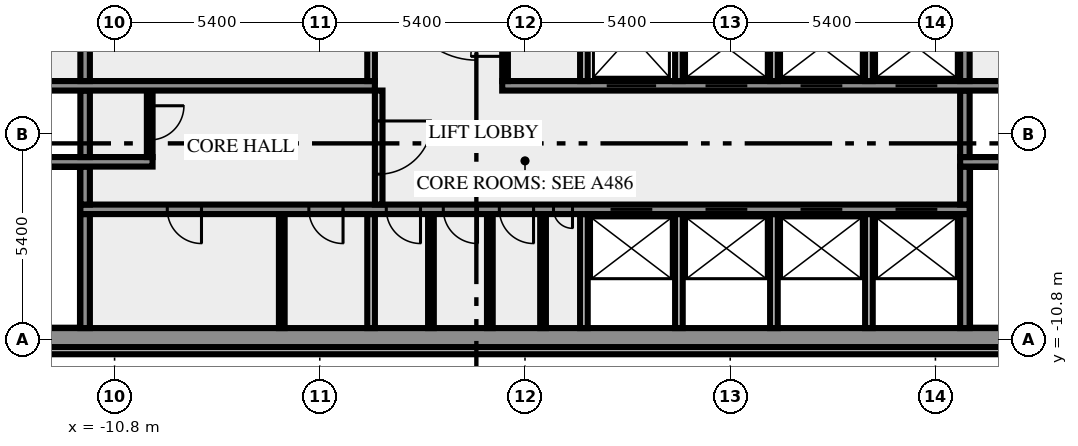
"""IFC4 building model, lengths in metres.
Left out: names, types, materials, properties, quantities, classifications, styles, units other than length and angle.
Written with IfcOpenShell. Run it as: python <this file> out.ifc"""

import sys

from ifc_helpers import new_model, si_unit, direction, frame, frame_2d, origin, place, context, subcontext, project, spatial, rectangle, extrude, element, fill, save


model = new_model("IFC4")
c1 = context("Model", 3, precision=1e-05, world=origin(), true_north=direction((0.0, 1.0)))
c2 = subcontext(c1, "Body", "Model", "MODEL_VIEW")
j1 = project(units=[si_unit("LENGTHUNIT", "METRE"), si_unit("PLANEANGLEUNIT", "RADIAN")], contexts=[c1])
p1 = place(None, origin())
s1 = spatial("IfcSite", under=j1, at=p1, CompositionType="ELEMENT")
p2 = place(p1, origin())
s2 = spatial("IfcBuilding", under=s1, at=p2, CompositionType="ELEMENT")
p3 = place(p2, frame((0.0, 0.0, 176.0)))
s3 = spatial("IfcBuildingStorey", under=s2, at=p3, CompositionType="ELEMENT", Elevation=176.0)
p4 = place(p3, frame((-17.444, -11.088, 0.0), z_axis=(0.0, 0.0, 1.0), x_axis=(1.0, 0.0, 0.0)))
e1 = element("IfcWall", 1, at=p4, inside=s3, PredefinedType="SOLIDWALL", context=c2, shape_type="SweptSolid", body=[
    extrude(rectangle(XDim=34.888, YDim=0.2, at=frame_2d((17.444, 0.0))), origin(), (0.0, 0.0, 1.0), 3.65),
])
p5 = place(p3, frame((-20.0, -10.75, 0.0), z_axis=(0.0, 0.0, 1.0), x_axis=(1.0, 0.0, 0.0)))
e2 = element("IfcWall", 2, at=p5, inside=s3, PredefinedType="SHEAR", context=c2, shape_type="SweptSolid", body=[
    extrude(rectangle(XDim=40.0, YDim=0.5, at=frame_2d((20.0, 0.0))), origin(), (0.0, 0.0, 1.0), 3.65),
])
p6 = place(p5, frame((0.8, 0.0, 1.0)))
e3 = element("IfcOpeningElement", 3, at=p6, cuts=e2, PredefinedType="OPENING", context=c2, shape_type="SweptSolid", body=[
    extrude(rectangle(XDim=1.2, YDim=1.2, at=frame_2d((0.6, 0.6))), frame((0.0, 0.26, 0.0), z_axis=(0.0, -1.0, 0.0), x_axis=(1.0, 0.0, 0.0)), (0.0, 0.0, 1.0), 0.52),
])
p7 = place(p5, frame((38.0, 0.0, 1.0)))
e4 = element("IfcOpeningElement", 4, at=p7, cuts=e2, PredefinedType="OPENING", context=c2, shape_type="SweptSolid", body=[
    extrude(rectangle(XDim=1.2, YDim=1.2, at=frame_2d((0.6, 0.6))), frame((0.0, 0.26, 0.0), z_axis=(0.0, -1.0, 0.0), x_axis=(1.0, 0.0, 0.0)), (0.0, 0.0, 1.0), 0.52),
])
p8 = place(p3, frame((-11.575, -10.5, 0.0), z_axis=(0.0, 0.0, 1.0), x_axis=(0.0, 1.0, 0.0)))
e5 = element("IfcWall", 5, at=p8, inside=s3, PredefinedType="SHEAR", context=c2, shape_type="SweptSolid", body=[
    extrude(rectangle(XDim=3.0, YDim=0.25, at=frame_2d((1.5, 0.0))), origin(), (0.0, 0.0, 1.0), 3.65),
])
p9 = place(p3, frame((-6.4, -10.5, 0.0), z_axis=(0.0, 0.0, 1.0), x_axis=(0.0, 1.0, 0.0)))
e6 = element("IfcWall", 6, at=p9, inside=s3, PredefinedType="PARTITIONING", context=c2, shape_type="SweptSolid", body=[
    extrude(rectangle(XDim=3.0, YDim=0.15, at=frame_2d((1.5, 0.0))), origin(), (0.0, 0.0, 1.0), 3.65),
])
p10 = place(p3, frame((-4.05, -10.5, 0.0), z_axis=(0.0, 0.0, 1.0), x_axis=(0.0, 1.0, 0.0)))
e7 = element("IfcWall", 7, at=p10, inside=s3, PredefinedType="SOLIDWALL", context=c2, shape_type="SweptSolid", body=[
    extrude(rectangle(XDim=3.0, YDim=0.2, at=frame_2d((1.5, 0.0))), origin(), (0.0, 0.0, 1.0), 3.65),
])
for number, where, z_axis, x_axis in (
    (8, (-2.475, -10.5, 0.0), (0.0, 0.0, 1.0), (0.0, 1.0, 0.0)),
    (9, (-0.925, -10.5, 0.0), (0.0, 0.0, 1.0), (0.0, 1.0, 0.0)),
    (10, (0.475, -10.5, 0.0), (0.0, 0.0, 1.0), (0.0, 1.0, 0.0)),
):
    element("IfcWall", number, at=place(p3, frame(where, z_axis=z_axis, x_axis=x_axis)), inside=s3, PredefinedType="PARTITIONING", context=c2, shape_type="SweptSolid", body=[
        extrude(rectangle(XDim=3.0, YDim=0.15, at=frame_2d((1.5, 0.0))), origin(), (0.0, 0.0, 1.0), 3.65),
    ])
for number, where, z_axis, x_axis in (
    (11, (1.55, -10.5, 0.0), (0.0, 0.0, 1.0), (0.0, 1.0, 0.0)),
    (12, (4.05, -10.5, 0.0), (0.0, 0.0, 1.0), (0.0, 1.0, 0.0)),
    (13, (6.55, -10.5, 0.0), (0.0, 0.0, 1.0), (0.0, 1.0, 0.0)),
    (14, (9.05, -10.5, 0.0), (0.0, 0.0, 1.0), (0.0, 1.0, 0.0)),
):
    element("IfcWall", number, at=place(p3, frame(where, z_axis=z_axis, x_axis=x_axis)), inside=s3, PredefinedType="SOLIDWALL", context=c2, shape_type="SweptSolid", body=[
        extrude(rectangle(XDim=3.0, YDim=0.2, at=frame_2d((1.5, 0.0))), origin(), (0.0, 0.0, 1.0), 3.65),
    ])
p11 = place(p3, frame((11.575, -10.5, 0.0), z_axis=(0.0, 0.0, 1.0), x_axis=(0.0, 1.0, 0.0)))
e15 = element("IfcWall", 15, at=p11, inside=s3, PredefinedType="SHEAR", context=c2, shape_type="SweptSolid", body=[
    extrude(rectangle(XDim=3.0, YDim=0.25, at=frame_2d((1.5, 0.0))), origin(), (0.0, 0.0, 1.0), 3.65),
])
p12 = place(p3, frame((11.7, -7.375, 0.0), z_axis=(0.0, 0.0, 1.0), x_axis=(-1.0, 0.0, 0.0)))
e16 = element("IfcWall", 16, at=p12, inside=s3, PredefinedType="SHEAR", context=c2, shape_type="SweptSolid", body=[
    extrude(rectangle(XDim=23.4, YDim=0.25, at=frame_2d((11.7, 0.0))), origin(), (0.0, 0.0, 1.0), 3.65),
])
p13 = place(p12, frame((20.213, 0.0, 0.0)))
e17 = element("IfcOpeningElement", 17, at=p13, cuts=e16, PredefinedType="OPENING", context=c2, shape_type="SweptSolid", body=[
    extrude(rectangle(XDim=0.9, YDim=2.1, at=frame_2d((0.45, 1.05))), frame((0.0, 0.135, 0.0), z_axis=(0.0, -1.0, 0.0), x_axis=(1.0, 0.0, 0.0)), (0.0, 0.0, 1.0), 0.27),
])
p14 = place(p12, frame((16.488, 0.0, 0.0)))
e18 = element("IfcOpeningElement", 18, at=p14, cuts=e16, PredefinedType="OPENING", context=c2, shape_type="SweptSolid", body=[
    extrude(rectangle(XDim=0.9, YDim=2.1, at=frame_2d((0.45, 1.05))), frame((0.0, 0.135, 0.0), z_axis=(0.0, -1.0, 0.0), x_axis=(1.0, 0.0, 0.0)), (0.0, 0.0, 1.0), 0.27),
])
p15 = place(p12, frame((14.45, 0.0, 0.0)))
e19 = element("IfcOpeningElement", 19, at=p15, cuts=e16, PredefinedType="OPENING", context=c2, shape_type="SweptSolid", body=[
    extrude(rectangle(XDim=0.9, YDim=2.1, at=frame_2d((0.45, 1.05))), frame((0.0, 0.135, 0.0), z_axis=(0.0, -1.0, 0.0), x_axis=(1.0, 0.0, 0.0)), (0.0, 0.0, 1.0), 0.27),
])
p16 = place(p12, frame((12.95, 0.0, 0.0)))
e20 = element("IfcOpeningElement", 20, at=p16, cuts=e16, PredefinedType="OPENING", context=c2, shape_type="SweptSolid", body=[
    extrude(rectangle(XDim=0.9, YDim=2.1, at=frame_2d((0.45, 1.05))), frame((0.0, 0.135, 0.0), z_axis=(0.0, -1.0, 0.0), x_axis=(1.0, 0.0, 0.0)), (0.0, 0.0, 1.0), 0.27),
])
p17 = place(p12, frame((11.475, 0.0, 0.0)))
e21 = element("IfcOpeningElement", 21, at=p17, cuts=e16, PredefinedType="OPENING", context=c2, shape_type="SweptSolid", body=[
    extrude(rectangle(XDim=0.9, YDim=2.1, at=frame_2d((0.45, 1.05))), frame((0.0, 0.135, 0.0), z_axis=(0.0, -1.0, 0.0), x_axis=(1.0, 0.0, 0.0)), (0.0, 0.0, 1.0), 0.27),
])
p18 = place(p12, frame((10.45, 0.0, 0.0)))
e22 = element("IfcOpeningElement", 22, at=p18, cuts=e16, PredefinedType="OPENING", context=c2, shape_type="SweptSolid", body=[
    extrude(rectangle(XDim=0.5, YDim=2.1, at=frame_2d((0.25, 1.05))), frame((0.0, 0.135, 0.0), z_axis=(0.0, -1.0, 0.0), x_axis=(1.0, 0.0, 0.0)), (0.0, 0.0, 1.0), 0.27),
])
p19 = place(p12, frame((8.35, 0.0, 0.0)))
e23 = element("IfcOpeningElement", 23, at=p19, cuts=e16, PredefinedType="OPENING", context=c2, shape_type="SweptSolid", body=[
    extrude(rectangle(XDim=1.1, YDim=2.1, at=frame_2d((0.55, 1.05))), frame((0.0, 0.135, 0.0), z_axis=(0.0, -1.0, 0.0), x_axis=(1.0, 0.0, 0.0)), (0.0, 0.0, 1.0), 0.27),
])
p20 = place(p12, frame((5.85, 0.0, 0.0)))
e24 = element("IfcOpeningElement", 24, at=p20, cuts=e16, PredefinedType="OPENING", context=c2, shape_type="SweptSolid", body=[
    extrude(rectangle(XDim=1.1, YDim=2.1, at=frame_2d((0.55, 1.05))), frame((0.0, 0.135, 0.0), z_axis=(0.0, -1.0, 0.0), x_axis=(1.0, 0.0, 0.0)), (0.0, 0.0, 1.0), 0.27),
])
p21 = place(p12, frame((3.35, 0.0, 0.0)))
e25 = element("IfcOpeningElement", 25, at=p21, cuts=e16, PredefinedType="OPENING", context=c2, shape_type="SweptSolid", body=[
    extrude(rectangle(XDim=1.1, YDim=2.1, at=frame_2d((0.55, 1.05))), frame((0.0, 0.135, 0.0), z_axis=(0.0, -1.0, 0.0), x_axis=(1.0, 0.0, 0.0)), (0.0, 0.0, 1.0), 0.27),
])
p22 = place(p12, frame((0.85, 0.0, 0.0)))
e26 = element("IfcOpeningElement", 26, at=p22, cuts=e16, PredefinedType="OPENING", context=c2, shape_type="SweptSolid", body=[
    extrude(rectangle(XDim=1.1, YDim=2.1, at=frame_2d((0.55, 1.05))), frame((0.0, 0.135, 0.0), z_axis=(0.0, -1.0, 0.0), x_axis=(1.0, 0.0, 0.0)), (0.0, 0.0, 1.0), 0.27),
])
p23 = place(p3, frame((-11.575, -7.25, 0.0), z_axis=(0.0, 0.0, 1.0), x_axis=(0.0, 1.0, 0.0)))
e27 = element("IfcWall", 27, at=p23, inside=s3, PredefinedType="SHEAR", context=c2, shape_type="SweptSolid", body=[
    extrude(rectangle(XDim=1.0, YDim=0.25, at=frame_2d((0.5, 0.0))), origin(), (0.0, 0.0, 1.0), 3.65),
])
p24 = place(p3, frame((-3.85, -4.25, 0.0), z_axis=(0.0, 0.0, 1.0), x_axis=(0.0, -1.0, 0.0)))
e28 = element("IfcWall", 28, at=p24, inside=s3, PredefinedType="SOLIDWALL", context=c2, shape_type="SweptSolid", body=[
    extrude(rectangle(XDim=3.0, YDim=0.2, at=frame_2d((1.5, 0.0))), origin(), (0.0, 0.0, 1.0), 3.65),
])
p25 = place(p24, frame((0.8, 0.0, 0.0)))
e29 = element("IfcOpeningElement", 29, at=p25, cuts=e28, PredefinedType="OPENING", context=c2, shape_type="SweptSolid", body=[
    extrude(rectangle(XDim=1.4, YDim=2.1, at=frame_2d((0.7, 1.05))), frame((0.0, 0.11, 0.0), z_axis=(0.0, -1.0, 0.0), x_axis=(1.0, 0.0, 0.0)), (0.0, 0.0, 1.0), 0.22),
])
p26 = place(p3, frame((11.575, -7.25, 0.0), z_axis=(0.0, 0.0, 1.0), x_axis=(0.0, 1.0, 0.0)))
e30 = element("IfcWall", 30, at=p26, inside=s3, PredefinedType="SHEAR", context=c2, shape_type="SweptSolid", body=[
    extrude(rectangle(XDim=1.0, YDim=0.25, at=frame_2d((0.5, 0.0))), origin(), (0.0, 0.0, 1.0), 3.65),
])
p27 = place(p3, frame((-9.8, -6.125, 0.0), z_axis=(0.0, 0.0, 1.0), x_axis=(-1.0, 0.0, 0.0)))
e31 = element("IfcWall", 31, at=p27, inside=s3, PredefinedType="SHEAR", context=c2, shape_type="SweptSolid", body=[
    extrude(rectangle(XDim=10.2, YDim=0.25, at=frame_2d((5.1, 0.0))), origin(), (0.0, 0.0, 1.0), 3.65),
])
p28 = place(p27, frame((7.85, 0.0, 0.0)))
e32 = element("IfcOpeningElement", 32, at=p28, cuts=e31, PredefinedType="OPENING", context=c2, shape_type="SweptSolid", body=[
    extrude(rectangle(XDim=1.8, YDim=2.1, at=frame_2d((0.9, 1.05))), frame((0.0, 0.135, 0.0), z_axis=(0.0, -1.0, 0.0), x_axis=(1.0, 0.0, 0.0)), (0.0, 0.0, 1.0), 0.27),
])
p29 = place(p3, frame((19.5, -6.125, 0.0), z_axis=(0.0, 0.0, 1.0), x_axis=(-1.0, 0.0, 0.0)))
e33 = element("IfcWall", 33, at=p29, inside=s3, PredefinedType="SHEAR", context=c2, shape_type="SweptSolid", body=[
    extrude(rectangle(XDim=8.05, YDim=0.25, at=frame_2d((4.025, 0.0))), origin(), (0.0, 0.0, 1.0), 3.65),
])
p30 = place(p29, frame((0.05, 0.0, 0.0)))
e34 = element("IfcOpeningElement", 34, at=p30, cuts=e33, PredefinedType="OPENING", context=c2, shape_type="SweptSolid", body=[
    extrude(rectangle(XDim=1.8, YDim=2.1, at=frame_2d((0.9, 1.05))), frame((0.0, 0.135, 0.0), z_axis=(0.0, -1.0, 0.0), x_axis=(1.0, 0.0, 0.0)), (0.0, 0.0, 1.0), 0.27),
])
p31 = place(p3, frame((-11.575, -6.0, 0.0), z_axis=(0.0, 0.0, 1.0), x_axis=(0.0, 1.0, 0.0)))
e35 = element("IfcWall", 35, at=p31, inside=s3, PredefinedType="SHEAR", context=c2, shape_type="SweptSolid", body=[
    extrude(rectangle(XDim=1.75, YDim=0.25, at=frame_2d((0.875, 0.0))), origin(), (0.0, 0.0, 1.0), 3.65),
])
p32 = place(p3, frame((-9.875, -4.25, 0.0), z_axis=(0.0, 0.0, 1.0), x_axis=(0.0, -1.0, 0.0)))
e36 = element("IfcWall", 36, at=p32, inside=s3, PredefinedType="PARTITIONING", context=c2, shape_type="SweptSolid", body=[
    extrude(rectangle(XDim=1.75, YDim=0.15, at=frame_2d((0.875, 0.0))), origin(), (0.0, 0.0, 1.0), 3.65),
])
p33 = place(p32, frame((0.4, 0.0, 0.0)))
e37 = element("IfcOpeningElement", 37, at=p33, cuts=e36, PredefinedType="OPENING", context=c2, shape_type="SweptSolid", body=[
    extrude(rectangle(XDim=0.9, YDim=2.1, at=frame_2d((0.45, 1.05))), frame((0.0, 0.085, 0.0), z_axis=(0.0, -1.0, 0.0), x_axis=(1.0, 0.0, 0.0)), (0.0, 0.0, 1.0), 0.17),
])
p34 = place(p3, frame((11.575, -6.0, 0.0), z_axis=(0.0, 0.0, 1.0), x_axis=(0.0, 1.0, 0.0)))
e38 = element("IfcWall", 38, at=p34, inside=s3, PredefinedType="SHEAR", context=c2, shape_type="SweptSolid", body=[
    extrude(rectangle(XDim=1.75, YDim=0.25, at=frame_2d((0.875, 0.0))), origin(), (0.0, 0.0, 1.0), 3.65),
])
p35 = place(p3, frame((-14.35, -4.125, 0.0), z_axis=(0.0, 0.0, 1.0), x_axis=(1.0, 0.0, 0.0)))
e39 = element("IfcWall", 39, at=p35, inside=s3, PredefinedType="SHEAR", context=c2, shape_type="SweptSolid", body=[
    extrude(rectangle(XDim=10.4, YDim=0.25, at=frame_2d((5.2, 0.0))), origin(), (0.0, 0.0, 1.0), 3.65),
])
p36 = place(p3, frame((-0.6, -4.125, 0.0), z_axis=(0.0, 0.0, 1.0), x_axis=(1.0, 0.0, 0.0)))
e40 = element("IfcWall", 40, at=p36, inside=s3, PredefinedType="SHEAR", context=c2, shape_type="SweptSolid", body=[
    extrude(rectangle(XDim=14.95, YDim=0.25, at=frame_2d((7.475, 0.0))), origin(), (0.0, 0.0, 1.0), 3.65),
])
p37 = place(p36, frame((2.75, 0.0, 0.0)))
e41 = element("IfcOpeningElement", 41, at=p37, cuts=e40, PredefinedType="OPENING", context=c2, shape_type="SweptSolid", body=[
    extrude(rectangle(XDim=1.3, YDim=2.1, at=frame_2d((0.65, 1.05))), frame((0.0, 0.135, 0.0), z_axis=(0.0, -1.0, 0.0), x_axis=(1.0, 0.0, 0.0)), (0.0, 0.0, 1.0), 0.27),
])
p38 = place(p36, frame((5.35, 0.0, 0.0)))
e42 = element("IfcOpeningElement", 42, at=p38, cuts=e40, PredefinedType="OPENING", context=c2, shape_type="SweptSolid", body=[
    extrude(rectangle(XDim=1.1, YDim=2.1, at=frame_2d((0.55, 1.05))), frame((0.0, 0.135, 0.0), z_axis=(0.0, -1.0, 0.0), x_axis=(1.0, 0.0, 0.0)), (0.0, 0.0, 1.0), 0.27),
])
p39 = place(p36, frame((7.85, 0.0, 0.0)))
e43 = element("IfcOpeningElement", 43, at=p39, cuts=e40, PredefinedType="OPENING", context=c2, shape_type="SweptSolid", body=[
    extrude(rectangle(XDim=1.1, YDim=2.1, at=frame_2d((0.55, 1.05))), frame((0.0, 0.135, 0.0), z_axis=(0.0, -1.0, 0.0), x_axis=(1.0, 0.0, 0.0)), (0.0, 0.0, 1.0), 0.27),
])
p40 = place(p36, frame((10.35, 0.0, 0.0)))
e44 = element("IfcOpeningElement", 44, at=p40, cuts=e40, PredefinedType="OPENING", context=c2, shape_type="SweptSolid", body=[
    extrude(rectangle(XDim=1.1, YDim=2.1, at=frame_2d((0.55, 1.05))), frame((0.0, 0.135, 0.0), z_axis=(0.0, -1.0, 0.0), x_axis=(1.0, 0.0, 0.0)), (0.0, 0.0, 1.0), 0.27),
])
p41 = place(p3, frame((-11.575, -4.0, 0.0), z_axis=(0.0, 0.0, 1.0), x_axis=(0.0, 1.0, 0.0)))
e45 = element("IfcWall", 45, at=p41, inside=s3, PredefinedType="SHEAR", context=c2, shape_type="SweptSolid", body=[
    extrude(rectangle(XDim=2.3, YDim=0.25, at=frame_2d((1.15, 0.0))), origin(), (0.0, 0.0, 1.0), 3.65),
])
p42 = place(p3, frame((-4.05, -4.0, 0.0), z_axis=(0.0, 0.0, 1.0), x_axis=(0.0, 1.0, 0.0)))
e46 = element("IfcWall", 46, at=p42, inside=s3, PredefinedType="SOLIDWALL", context=c2, shape_type="SweptSolid", body=[
    extrude(rectangle(XDim=2.3, YDim=0.2, at=frame_2d((1.15, 0.0))), origin(), (0.0, 0.0, 1.0), 3.65),
])
p43 = place(p3, frame((-0.525, -4.0, 0.0), z_axis=(0.0, 0.0, 1.0), x_axis=(0.0, 1.0, 0.0)))
e47 = element("IfcWall", 47, at=p43, inside=s3, PredefinedType="PARTITIONING", context=c2, shape_type="SweptSolid", body=[
    extrude(rectangle(XDim=2.3, YDim=0.15, at=frame_2d((1.15, 0.0))), origin(), (0.0, 0.0, 1.0), 3.65),
])
p44 = place(p43, frame((0.65, 0.0, 0.0)))
e48 = element("IfcOpeningElement", 48, at=p44, cuts=e47, PredefinedType="OPENING", context=c2, shape_type="SweptSolid", body=[
    extrude(rectangle(XDim=0.9, YDim=2.1, at=frame_2d((0.45, 1.05))), frame((0.0, 0.085, 0.0), z_axis=(0.0, -1.0, 0.0), x_axis=(1.0, 0.0, 0.0)), (0.0, 0.0, 1.0), 0.17),
])
for number, where, z_axis, x_axis in (
    (49, (1.55, -4.0, 0.0), (0.0, 0.0, 1.0), (0.0, 1.0, 0.0)),
    (50, (4.05, -4.0, 0.0), (0.0, 0.0, 1.0), (0.0, 1.0, 0.0)),
    (51, (6.55, -4.0, 0.0), (0.0, 0.0, 1.0), (0.0, 1.0, 0.0)),
    (52, (9.05, -4.0, 0.0), (0.0, 0.0, 1.0), (0.0, 1.0, 0.0)),
):
    element("IfcWall", number, at=place(p3, frame(where, z_axis=z_axis, x_axis=x_axis)), inside=s3, PredefinedType="SOLIDWALL", context=c2, shape_type="SweptSolid", body=[
        extrude(rectangle(XDim=2.3, YDim=0.2, at=frame_2d((1.15, 0.0))), origin(), (0.0, 0.0, 1.0), 3.65),
    ])
p45 = place(p3, frame((11.575, -4.0, 0.0), z_axis=(0.0, 0.0, 1.0), x_axis=(0.0, 1.0, 0.0)))
e53 = element("IfcWall", 53, at=p45, inside=s3, PredefinedType="SHEAR", context=c2, shape_type="SweptSolid", body=[
    extrude(rectangle(XDim=2.3, YDim=0.25, at=frame_2d((1.15, 0.0))), origin(), (0.0, 0.0, 1.0), 3.65),
])
p46 = place(p13, origin())
e54 = element("IfcDoor", 54, at=p46, inside=s3, OperationType="SINGLE_SWING_RIGHT", PredefinedType="DOOR", context=c2, shape_type="SweptSolid", body=[
    extrude(rectangle(XDim=0.9, YDim=2.1, at=frame_2d((0.45, 1.05))), frame((0.0, 0.025, 0.0), z_axis=(0.0, -1.0, 0.0), x_axis=(1.0, 0.0, 0.0)), (0.0, 0.0, 1.0), 0.05),
])
fill(e17, e54)
p47 = place(p14, origin())
e55 = element("IfcDoor", 55, at=p47, inside=s3, OperationType="SINGLE_SWING_RIGHT", PredefinedType="DOOR", context=c2, shape_type="SweptSolid", body=[
    extrude(rectangle(XDim=0.9, YDim=2.1, at=frame_2d((0.45, 1.05))), frame((0.0, 0.025, 0.0), z_axis=(0.0, -1.0, 0.0), x_axis=(1.0, 0.0, 0.0)), (0.0, 0.0, 1.0), 0.05),
])
fill(e18, e55)
p48 = place(p15, origin())
e56 = element("IfcDoor", 56, at=p48, inside=s3, OperationType="SINGLE_SWING_RIGHT", PredefinedType="DOOR", context=c2, shape_type="SweptSolid", body=[
    extrude(rectangle(XDim=0.9, YDim=2.1, at=frame_2d((0.45, 1.05))), frame((0.0, 0.025, 0.0), z_axis=(0.0, -1.0, 0.0), x_axis=(1.0, 0.0, 0.0)), (0.0, 0.0, 1.0), 0.05),
])
fill(e19, e56)
p49 = place(p16, origin())
e57 = element("IfcDoor", 57, at=p49, inside=s3, OperationType="SINGLE_SWING_RIGHT", PredefinedType="DOOR", context=c2, shape_type="SweptSolid", body=[
    extrude(rectangle(XDim=0.9, YDim=2.1, at=frame_2d((0.45, 1.05))), frame((0.0, 0.025, 0.0), z_axis=(0.0, -1.0, 0.0), x_axis=(1.0, 0.0, 0.0)), (0.0, 0.0, 1.0), 0.05),
])
fill(e20, e57)
p50 = place(p17, origin())
e58 = element("IfcDoor", 58, at=p50, inside=s3, OperationType="SINGLE_SWING_RIGHT", PredefinedType="DOOR", context=c2, shape_type="SweptSolid", body=[
    extrude(rectangle(XDim=0.9, YDim=2.1, at=frame_2d((0.45, 1.05))), frame((0.0, 0.025, 0.0), z_axis=(0.0, -1.0, 0.0), x_axis=(1.0, 0.0, 0.0)), (0.0, 0.0, 1.0), 0.05),
])
fill(e21, e58)
p51 = place(p18, origin())
e59 = element("IfcDoor", 59, at=p51, inside=s3, OperationType="SINGLE_SWING_LEFT", PredefinedType="DOOR", context=c2, shape_type="SweptSolid", body=[
    extrude(rectangle(XDim=0.5, YDim=2.1, at=frame_2d((0.25, 1.05))), frame((0.0, 0.025, 0.0), z_axis=(0.0, -1.0, 0.0), x_axis=(1.0, 0.0, 0.0)), (0.0, 0.0, 1.0), 0.05),
])
fill(e22, e59)
p52 = place(p19, origin())
e60 = element("IfcDoor", 60, at=p52, inside=s3, OperationType="DOUBLE_DOOR_SLIDING", PredefinedType="DOOR", context=c2, shape_type="SweptSolid", body=[
    extrude(rectangle(XDim=1.1, YDim=2.1, at=frame_2d((0.55, 1.05))), frame((0.0, 0.025, 0.0), z_axis=(0.0, -1.0, 0.0), x_axis=(1.0, 0.0, 0.0)), (0.0, 0.0, 1.0), 0.05),
])
fill(e23, e60)
p53 = place(p20, origin())
e61 = element("IfcDoor", 61, at=p53, inside=s3, OperationType="DOUBLE_DOOR_SLIDING", PredefinedType="DOOR", context=c2, shape_type="SweptSolid", body=[
    extrude(rectangle(XDim=1.1, YDim=2.1, at=frame_2d((0.55, 1.05))), frame((0.0, 0.025, 0.0), z_axis=(0.0, -1.0, 0.0), x_axis=(1.0, 0.0, 0.0)), (0.0, 0.0, 1.0), 0.05),
])
fill(e24, e61)
p54 = place(p21, origin())
e62 = element("IfcDoor", 62, at=p54, inside=s3, OperationType="DOUBLE_DOOR_SLIDING", PredefinedType="DOOR", context=c2, shape_type="SweptSolid", body=[
    extrude(rectangle(XDim=1.1, YDim=2.1, at=frame_2d((0.55, 1.05))), frame((0.0, 0.025, 0.0), z_axis=(0.0, -1.0, 0.0), x_axis=(1.0, 0.0, 0.0)), (0.0, 0.0, 1.0), 0.05),
])
fill(e25, e62)
p55 = place(p22, origin())
e63 = element("IfcDoor", 63, at=p55, inside=s3, OperationType="DOUBLE_DOOR_SLIDING", PredefinedType="DOOR", context=c2, shape_type="SweptSolid", body=[
    extrude(rectangle(XDim=1.1, YDim=2.1, at=frame_2d((0.55, 1.05))), frame((0.0, 0.025, 0.0), z_axis=(0.0, -1.0, 0.0), x_axis=(1.0, 0.0, 0.0)), (0.0, 0.0, 1.0), 0.05),
])
fill(e26, e63)
p56 = place(p25, origin())
e64 = element("IfcDoor", 64, at=p56, inside=s3, OperationType="DOUBLE_DOOR_SINGLE_SWING", PredefinedType="DOOR", context=c2, shape_type="SweptSolid", body=[
    extrude(rectangle(XDim=1.4, YDim=2.1, at=frame_2d((0.7, 1.05))), frame((0.0, 0.025, 0.0), z_axis=(0.0, -1.0, 0.0), x_axis=(1.0, 0.0, 0.0)), (0.0, 0.0, 1.0), 0.05),
])
fill(e29, e64)
p57 = place(p33, origin())
e65 = element("IfcDoor", 65, at=p57, inside=s3, OperationType="SINGLE_SWING_LEFT", PredefinedType="DOOR", context=c2, shape_type="SweptSolid", body=[
    extrude(rectangle(XDim=0.9, YDim=2.1, at=frame_2d((0.45, 1.05))), frame((0.0, 0.025, 0.0), z_axis=(0.0, -1.0, 0.0), x_axis=(1.0, 0.0, 0.0)), (0.0, 0.0, 1.0), 0.05),
])
fill(e37, e65)
p58 = place(p37, origin())
e66 = element("IfcDoor", 66, at=p58, inside=s3, OperationType="DOUBLE_DOOR_SLIDING", PredefinedType="DOOR", context=c2, shape_type="SweptSolid", body=[
    extrude(rectangle(XDim=1.3, YDim=2.1, at=frame_2d((0.65, 1.05))), frame((0.0, 0.025, 0.0), z_axis=(0.0, -1.0, 0.0), x_axis=(1.0, 0.0, 0.0)), (0.0, 0.0, 1.0), 0.05),
])
fill(e41, e66)
p59 = place(p38, origin())
e67 = element("IfcDoor", 67, at=p59, inside=s3, OperationType="DOUBLE_DOOR_SLIDING", PredefinedType="DOOR", context=c2, shape_type="SweptSolid", body=[
    extrude(rectangle(XDim=1.1, YDim=2.1, at=frame_2d((0.55, 1.05))), frame((0.0, 0.025, 0.0), z_axis=(0.0, -1.0, 0.0), x_axis=(1.0, 0.0, 0.0)), (0.0, 0.0, 1.0), 0.05),
])
fill(e42, e67)
p60 = place(p39, origin())
e68 = element("IfcDoor", 68, at=p60, inside=s3, OperationType="DOUBLE_DOOR_SLIDING", PredefinedType="DOOR", context=c2, shape_type="SweptSolid", body=[
    extrude(rectangle(XDim=1.1, YDim=2.1, at=frame_2d((0.55, 1.05))), frame((0.0, 0.025, 0.0), z_axis=(0.0, -1.0, 0.0), x_axis=(1.0, 0.0, 0.0)), (0.0, 0.0, 1.0), 0.05),
])
fill(e43, e68)
p61 = place(p40, origin())
e69 = element("IfcDoor", 69, at=p61, inside=s3, OperationType="DOUBLE_DOOR_SLIDING", PredefinedType="DOOR", context=c2, shape_type="SweptSolid", body=[
    extrude(rectangle(XDim=1.1, YDim=2.1, at=frame_2d((0.55, 1.05))), frame((0.0, 0.025, 0.0), z_axis=(0.0, -1.0, 0.0), x_axis=(1.0, 0.0, 0.0)), (0.0, 0.0, 1.0), 0.05),
])
fill(e44, e69)
p62 = place(p44, origin())
e70 = element("IfcDoor", 70, at=p62, inside=s3, OperationType="SINGLE_SWING_LEFT", PredefinedType="DOOR", context=c2, shape_type="SweptSolid", body=[
    extrude(rectangle(XDim=0.9, YDim=2.1, at=frame_2d((0.45, 1.05))), frame((0.0, 0.025, 0.0), z_axis=(0.0, -1.0, 0.0), x_axis=(1.0, 0.0, 0.0)), (0.0, 0.0, 1.0), 0.05),
])
fill(e48, e70)
save(model, sys.argv[1])
